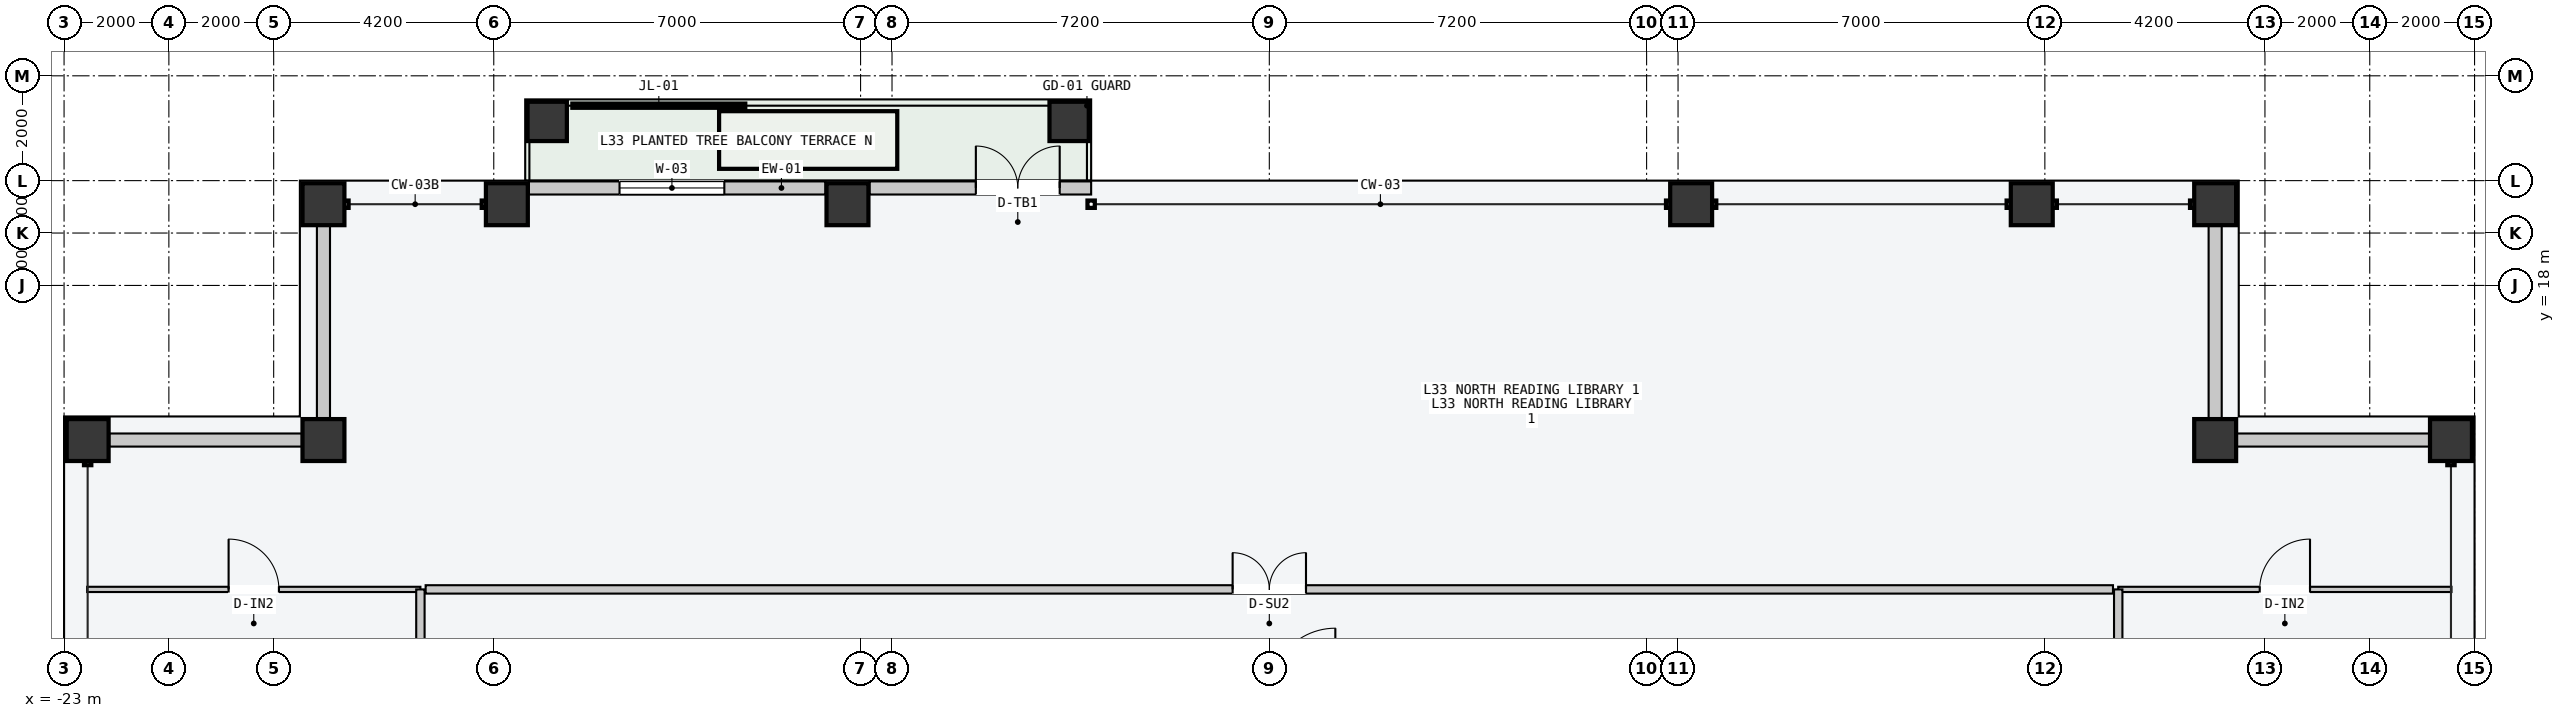
"""IFC4 building model, lengths in metres.
Left out: names, types, materials, properties, quantities, classifications, styles, units other than length and angle.
Written with IfcOpenShell. Run it as: python <this file> out.ifc"""

import sys

from ifc_helpers import new_model, si_unit, direction, frame, frame_2d, origin, origin_2d, place, context, subcontext, project, spatial, rectangle, hollow_rectangle, extrude, element, fill, save


model = new_model("IFC4")
c1 = context("Model", 3, precision=1e-05, world=origin(), true_north=direction((0.0, 1.0)))
c2 = subcontext(c1, "Body", "Model", "MODEL_VIEW")
j1 = project(units=[si_unit("LENGTHUNIT", "METRE"), si_unit("PLANEANGLEUNIT", "RADIAN")], contexts=[c1])
p1 = place(None, origin())
s1 = spatial("IfcSite", under=j1, at=p1, CompositionType="ELEMENT")
p2 = place(p1, origin())
s2 = spatial("IfcBuilding", under=s1, at=p2, CompositionType="ELEMENT")
p3 = place(p2, frame((0.0, 0.0, 127.8)))
s3 = spatial("IfcBuildingStorey", under=s2, at=p3, CompositionType="ELEMENT", Elevation=127.8)
for number, where, z_axis, x_axis in (
    (1, (-18.05, 19.55, 0.0), (0.0, 0.0, 1.0), (1.0, 0.0, 0.0)),
    (2, (-14.55, 19.55, 0.0), (0.0, 0.0, 1.0), (1.0, 0.0, 0.0)),
    (3, (-8.05, 19.55, 0.0), (0.0, 0.0, 1.0), (1.0, 0.0, 0.0)),
    (4, (8.05, 19.55, 0.0), (0.0, 0.0, 1.0), (1.0, 0.0, 0.0)),
    (5, (14.55, 19.55, 0.0), (0.0, 0.0, 1.0), (1.0, 0.0, 0.0)),
    (6, (18.05, 19.55, 0.0), (0.0, 0.0, 1.0), (1.0, 0.0, 0.0)),
    (7, (-22.55, 15.05, 0.0), (0.0, 0.0, 1.0), (0.0, 1.0, 0.0)),
    (8, (22.55, 15.05, 0.0), (0.0, 0.0, 1.0), (0.0, 1.0, 0.0)),
    (9, (-18.05, 15.05, 0.0), (0.0, 0.0, 1.0), (1.0, 0.0, 0.0)),
    (10, (18.05, 15.05, 0.0), (0.0, 0.0, 1.0), (1.0, 0.0, 0.0)),
):
    element("IfcColumn", number, at=place(p3, frame(where, z_axis=z_axis, x_axis=x_axis)), inside=s3, PredefinedType="COLUMN", context=c2, shape_type="SweptSolid", body=[
        extrude(hollow_rectangle(XDim=0.8, YDim=0.8, WallThickness=0.036, at=origin_2d()), origin(), (0.0, 0.0, 1.0), 3.6),
    ])
for number, where, z_axis, x_axis in (
    (11, (-13.78, 21.13, 0.0), (0.0, 0.0, 1.0), (1.0, 0.0, 0.0)),
    (12, (-3.82, 21.13, 0.0), (0.0, 0.0, 1.0), (1.0, 0.0, 0.0)),
):
    element("IfcColumn", number, at=place(p3, frame(where, z_axis=z_axis, x_axis=x_axis)), inside=s3, PredefinedType="COLUMN", context=c2, shape_type="SweptSolid", body=[
        extrude(hollow_rectangle(XDim=0.75, YDim=0.75, WallThickness=0.032, at=origin_2d()), origin(), (0.0, 0.0, 1.0), 3.6),
    ])
p4 = place(p3, frame((-14.13, 19.86, 0.0), z_axis=(0.0, 0.0, 1.0), x_axis=(1.0, 0.0, 0.0)))
e13 = element("IfcWall", 13, at=p4, inside=s3, PredefinedType="STANDARD", context=c2, shape_type="SweptSolid", body=[
    extrude(rectangle(XDim=5.66, YDim=0.25, at=frame_2d((2.83, 0.0))), origin(), (0.0, 0.0, 1.0), 3.4),
])
p5 = place(p4, frame((1.73, 0.0, 0.85)))
e14 = element("IfcOpeningElement", 14, at=p5, cuts=e13, PredefinedType="OPENING", context=c2, shape_type="SweptSolid", body=[
    extrude(rectangle(XDim=2.0, YDim=2.1, at=frame_2d((1.0, 1.05))), frame((0.0, 0.135, 0.0), z_axis=(0.0, -1.0, 0.0), x_axis=(1.0, 0.0, 0.0)), (0.0, 0.0, 1.0), 0.27),
])
p6 = place(p3, frame((-7.63, 19.86, 0.0), z_axis=(0.0, 0.0, 1.0), x_axis=(1.0, 0.0, 0.0)))
e15 = element("IfcWall", 15, at=p6, inside=s3, PredefinedType="STANDARD", context=c2, shape_type="SweptSolid", body=[
    extrude(rectangle(XDim=4.23, YDim=0.25, at=frame_2d((2.115, 0.0))), origin(), (0.0, 0.0, 1.0), 3.4),
])
p7 = place(p6, frame((2.03, 0.0, 0.0)))
e16 = element("IfcOpeningElement", 16, at=p7, cuts=e15, PredefinedType="OPENING", context=c2, shape_type="SweptSolid", body=[
    extrude(rectangle(XDim=1.6, YDim=2.2, at=frame_2d((0.8, 1.1))), frame((0.0, 0.135, 0.0), z_axis=(0.0, -1.0, 0.0), x_axis=(1.0, 0.0, 0.0)), (0.0, 0.0, 1.0), 0.27),
])
for number, where, z_axis, x_axis in (
    (17, (-22.14, 15.05, 0.0), (0.0, 0.0, 1.0), (1.0, 0.0, 0.0)),
    (18, (-18.05, 15.46, 0.0), (0.0, 0.0, 1.0), (0.0, 1.0, 0.0)),
    (19, (18.46, 15.05, 0.0), (0.0, 0.0, 1.0), (1.0, 0.0, 0.0)),
    (20, (18.05, 15.46, 0.0), (0.0, 0.0, 1.0), (0.0, 1.0, 0.0)),
):
    element("IfcWall", number, at=place(p3, frame(where, z_axis=z_axis, x_axis=x_axis)), inside=s3, PredefinedType="STANDARD", context=c2, shape_type="SweptSolid", body=[
        extrude(rectangle(XDim=3.68, YDim=0.25, at=frame_2d((1.84, 0.0))), origin(), (0.0, 0.0, 1.0), 2.75),
    ])
p8 = place(p3, frame((-16.1, 12.2, 0.0), z_axis=(0.0, 0.0, 1.0), x_axis=(1.0, 0.0, 0.0)))
e21 = element("IfcWall", 21, at=p8, inside=s3, PredefinedType="PARTITIONING", context=c2, shape_type="SweptSolid", body=[
    extrude(rectangle(XDim=32.2, YDim=0.16, at=frame_2d((16.1, 0.0))), origin(), (0.0, 0.0, 1.0), 3.4),
])
p9 = place(p8, frame((15.4, 0.0, 0.0)))
e22 = element("IfcOpeningElement", 22, at=p9, cuts=e21, PredefinedType="OPENING", context=c2, shape_type="SweptSolid", body=[
    extrude(rectangle(XDim=1.4, YDim=2.2, at=frame_2d((0.7, 1.1))), frame((0.0, 0.09, 0.0), z_axis=(0.0, -1.0, 0.0), x_axis=(1.0, 0.0, 0.0)), (0.0, 0.0, 1.0), 0.18),
])
p10 = place(p3, frame((-22.56, 12.2, 0.0), z_axis=(0.0, 0.0, 1.0), x_axis=(1.0, 0.0, 0.0)))
e23 = element("IfcWall", 23, at=p10, inside=s3, PredefinedType="PARTITIONING", context=c2, shape_type="SweptSolid", body=[
    extrude(rectangle(XDim=6.36, YDim=0.1, at=frame_2d((3.18, 0.0))), origin(), (0.0, 0.0, 1.0), 3.4),
])
p11 = place(p10, frame((2.7, 0.0, 0.0)))
e24 = element("IfcOpeningElement", 24, at=p11, cuts=e23, PredefinedType="OPENING", context=c2, shape_type="SweptSolid", body=[
    extrude(rectangle(XDim=0.96, YDim=2.18, at=frame_2d((0.48, 1.09))), frame((0.0, 0.06, 0.0), z_axis=(0.0, -1.0, 0.0), x_axis=(1.0, 0.0, 0.0)), (0.0, 0.0, 1.0), 0.12),
])
p12 = place(p3, frame((16.2, 12.2, 0.0), z_axis=(0.0, 0.0, 1.0), x_axis=(1.0, 0.0, 0.0)))
e25 = element("IfcWall", 25, at=p12, inside=s3, PredefinedType="PARTITIONING", context=c2, shape_type="SweptSolid", body=[
    extrude(rectangle(XDim=6.36, YDim=0.1, at=frame_2d((3.18, 0.0))), origin(), (0.0, 0.0, 1.0), 3.4),
])
p13 = place(p12, frame((2.7, 0.0, 0.0)))
e26 = element("IfcOpeningElement", 26, at=p13, cuts=e25, PredefinedType="OPENING", context=c2, shape_type="SweptSolid", body=[
    extrude(rectangle(XDim=0.96, YDim=2.18, at=frame_2d((0.48, 1.09))), frame((0.0, 0.06, 0.0), z_axis=(0.0, -1.0, 0.0), x_axis=(1.0, 0.0, 0.0)), (0.0, 0.0, 1.0), 0.12),
])
for number, where, z_axis, x_axis in (
    (27, (-16.2, 10.25, 0.0), (0.0, 0.0, 1.0), (0.0, 1.0, 0.0)),
    (28, (16.2, 10.25, 0.0), (0.0, 0.0, 1.0), (0.0, 1.0, 0.0)),
):
    element("IfcWall", number, at=place(p3, frame(where, z_axis=z_axis, x_axis=x_axis)), inside=s3, PredefinedType="PARTITIONING", context=c2, shape_type="SweptSolid", body=[
        extrude(rectangle(XDim=1.95, YDim=0.16, at=frame_2d((0.975, 0.0))), origin(), (0.0, 0.0, 1.0), 3.4),
    ])
p14 = place(p5, origin())
e29 = element("IfcWindow", 29, at=p14, inside=s3, PartitioningType="SINGLE_PANEL", PredefinedType="WINDOW", context=c2, shape_type="SweptSolid", body=[
    extrude(rectangle(XDim=2.0, YDim=2.1, at=frame_2d((1.0, 1.05))), frame((0.0, 0.03, 0.0), z_axis=(0.0, -1.0, 0.0), x_axis=(1.0, 0.0, 0.0)), (0.0, 0.0, 1.0), 0.06),
])
fill(e14, e29)
p15 = place(p7, origin())
e30 = element("IfcDoor", 30, at=p15, inside=s3, OperationType="DOUBLE_DOOR_SINGLE_SWING", PredefinedType="DOOR", context=c2, shape_type="SweptSolid", body=[
    extrude(rectangle(XDim=1.6, YDim=2.2, at=frame_2d((0.8, 1.1))), frame((0.0, 0.025, 0.0), z_axis=(0.0, -1.0, 0.0), x_axis=(1.0, 0.0, 0.0)), (0.0, 0.0, 1.0), 0.05),
])
fill(e16, e30)
p16 = place(p9, origin())
e31 = element("IfcDoor", 31, at=p16, inside=s3, OperationType="DOUBLE_DOOR_SINGLE_SWING", PredefinedType="DOOR", context=c2, shape_type="SweptSolid", body=[
    extrude(rectangle(XDim=1.4, YDim=2.2, at=frame_2d((0.7, 1.1))), frame((0.0, 0.025, 0.0), z_axis=(0.0, -1.0, 0.0), x_axis=(1.0, 0.0, 0.0)), (0.0, 0.0, 1.0), 0.05),
])
fill(e22, e31)
p17 = place(p11, origin())
e32 = element("IfcDoor", 32, at=p17, inside=s3, OperationType="SINGLE_SWING_LEFT", PredefinedType="DOOR", context=c2, shape_type="SweptSolid", body=[
    extrude(rectangle(XDim=0.96, YDim=2.18, at=frame_2d((0.48, 1.09))), frame((0.0, 0.025, 0.0), z_axis=(0.0, -1.0, 0.0), x_axis=(1.0, 0.0, 0.0)), (0.0, 0.0, 1.0), 0.05),
])
fill(e24, e32)
p18 = place(p13, origin())
e33 = element("IfcDoor", 33, at=p18, inside=s3, OperationType="SINGLE_SWING_RIGHT", PredefinedType="DOOR", context=c2, shape_type="SweptSolid", body=[
    extrude(rectangle(XDim=0.96, YDim=2.18, at=frame_2d((0.48, 1.09))), frame((0.0, 0.025, 0.0), z_axis=(0.0, -1.0, 0.0), x_axis=(1.0, 0.0, 0.0)), (0.0, 0.0, 1.0), 0.05),
])
fill(e26, e33)
save(model, sys.argv[1])
